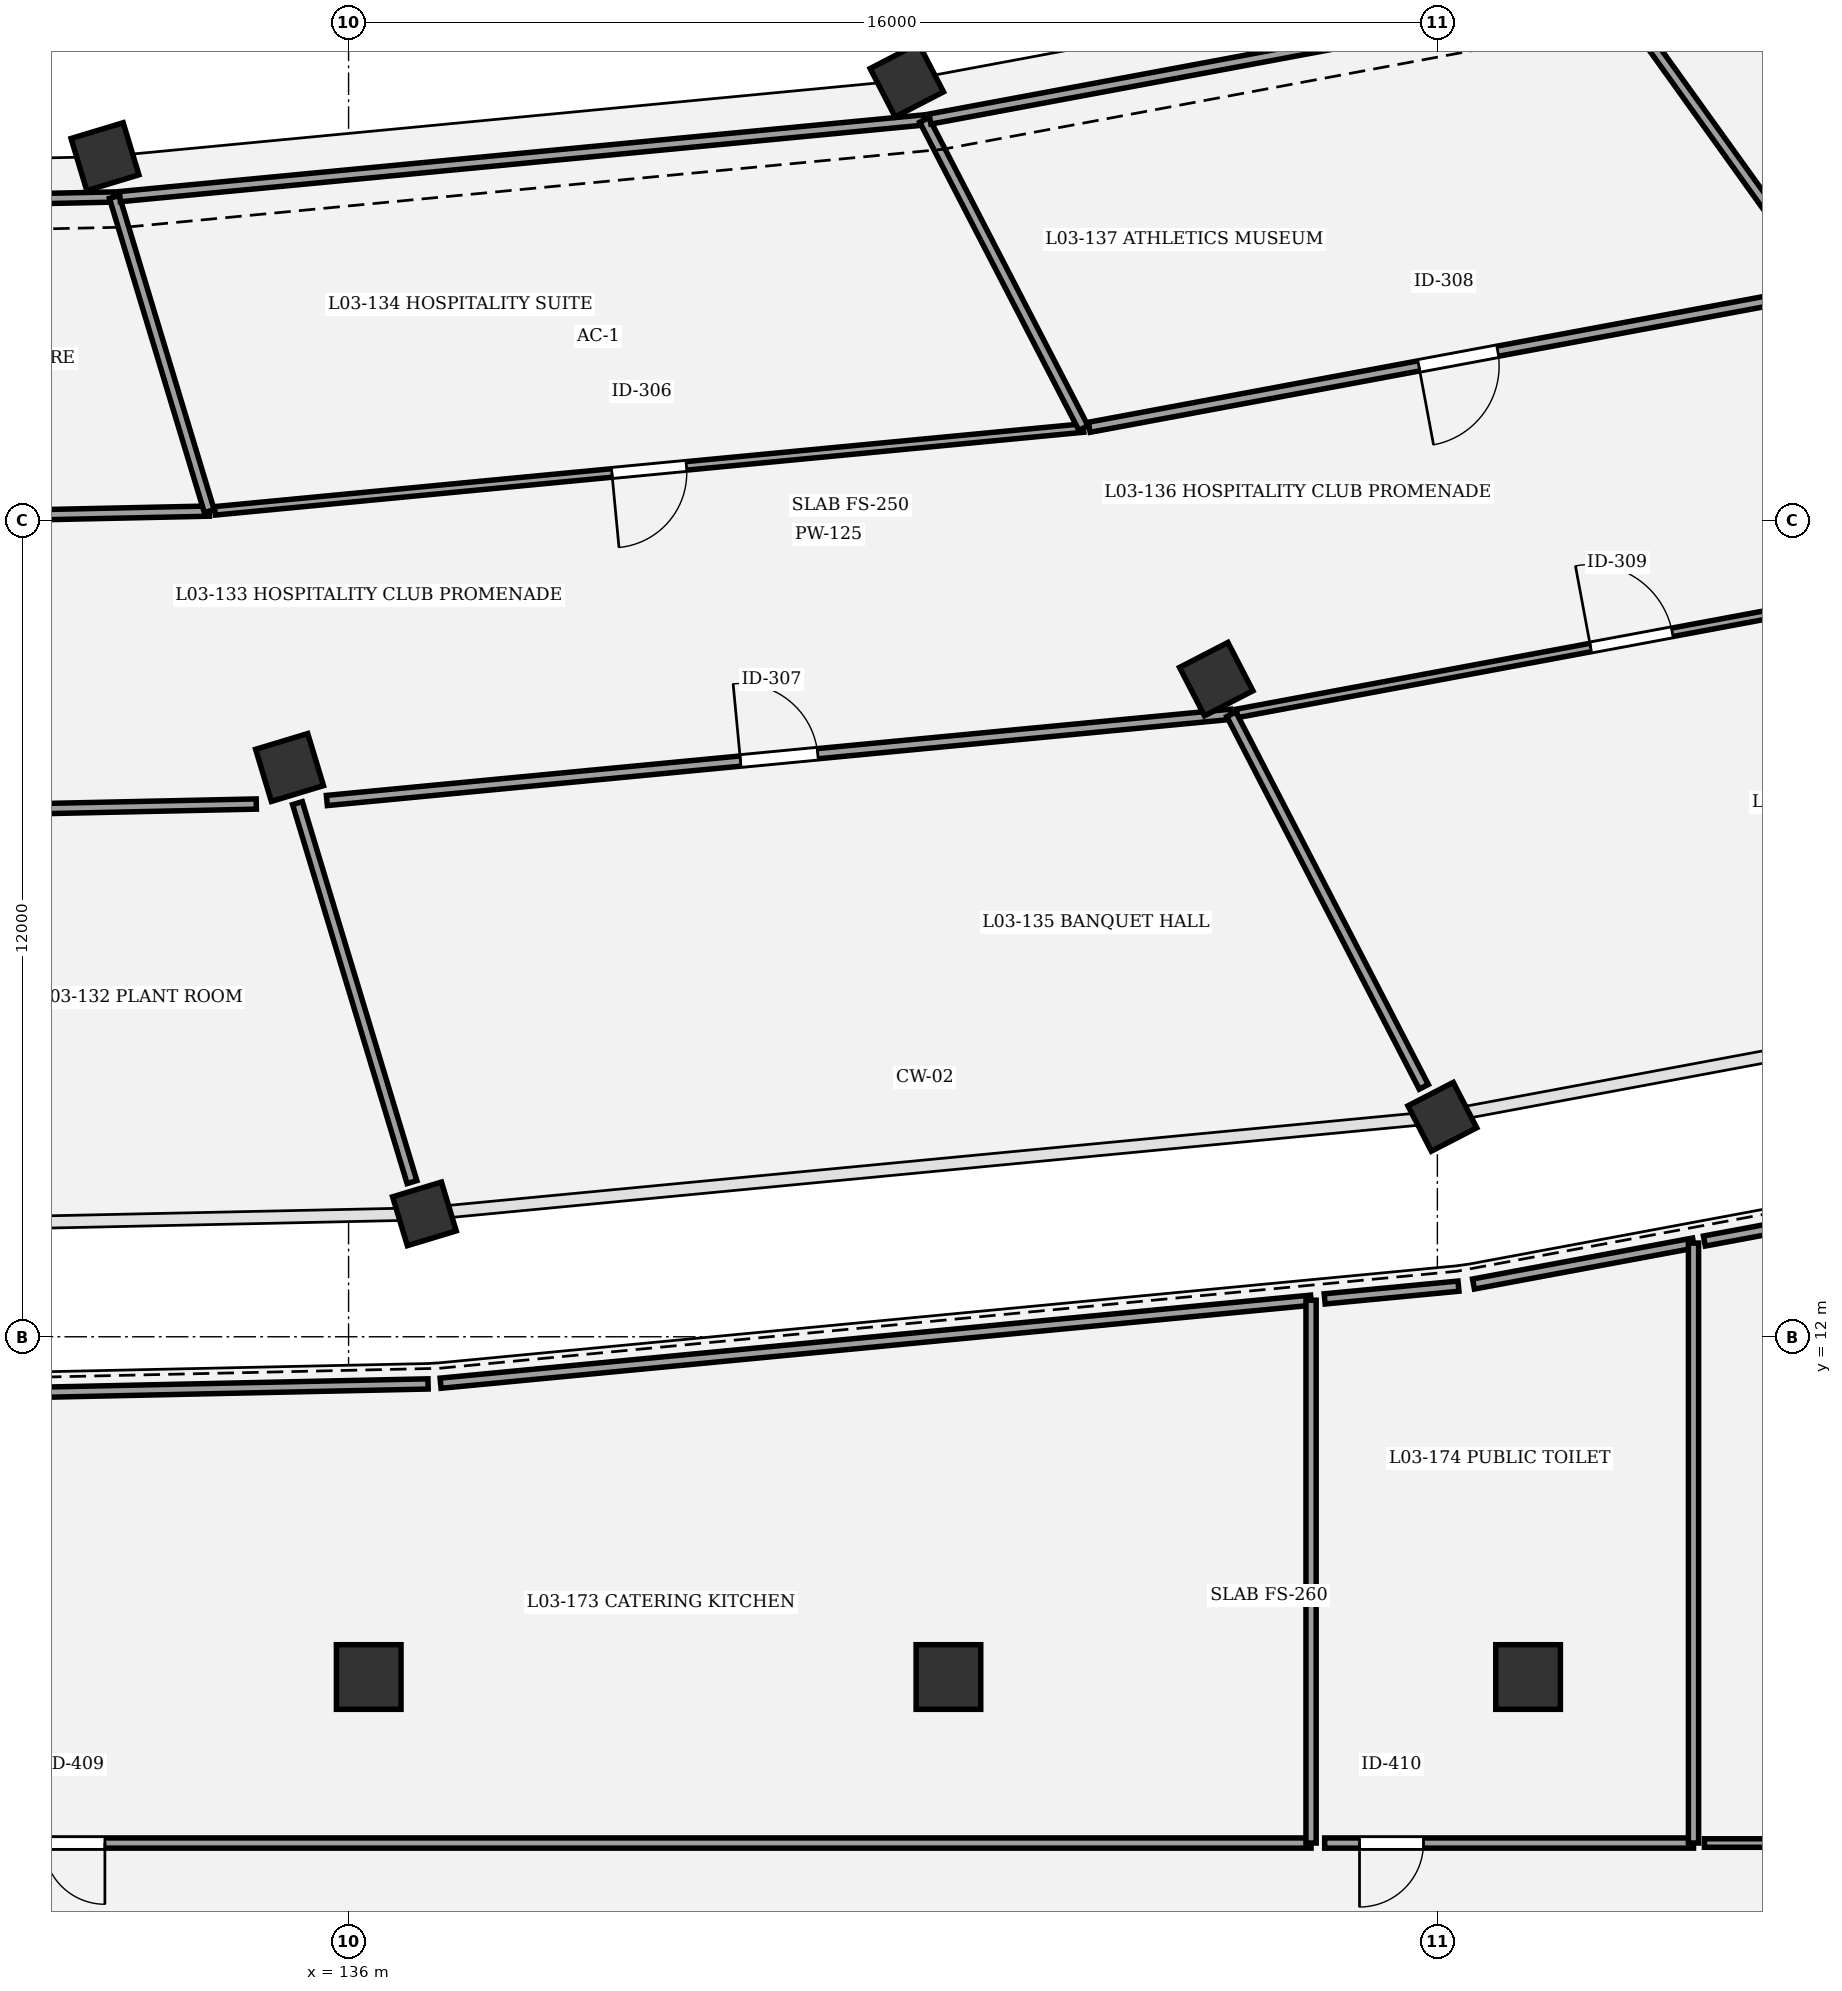
"""IFC4 building model, lengths in metres.
Left out: names, types, materials, properties, quantities, classifications, styles, units other than length and angle.
Written with IfcOpenShell. Run it as: python <this file> out.ifc"""

import sys

from ifc_helpers import new_model, si_unit, direction, frame, frame_2d, origin, origin_2d, place, context, subcontext, project, spatial, rectangle, circle, extrude, element, fill, save


model = new_model("IFC4")
c1 = context("Model", 3, precision=1e-05, world=origin(), true_north=direction((0.0, 1.0)))
c2 = subcontext(c1, "Body", "Model", "MODEL_VIEW")
j1 = project(units=[si_unit("LENGTHUNIT", "METRE"), si_unit("PLANEANGLEUNIT", "RADIAN")], contexts=[c1])
p1 = place(None, origin())
s1 = spatial("IfcSite", under=j1, at=p1, CompositionType="ELEMENT")
p2 = place(p1, origin())
s2 = spatial("IfcBuilding", under=s1, at=p2, CompositionType="ELEMENT")
p3 = place(p2, frame((0.0, 0.0, 14.7)))
s3 = spatial("IfcBuildingStorey", under=s2, at=p3, CompositionType="ELEMENT", Elevation=14.7)
p4 = place(p3, frame((132.42, 29.343, 0.0), z_axis=(0.0, 0.0, 1.0), x_axis=(0.289198876314, -0.957269037387, 0.0)))
e1 = element("IfcColumn", 1, at=p4, inside=s3, PredefinedType="COLUMN", context=c2, shape_type="SweptSolid", body=[
    extrude(rectangle(XDim=0.8, YDim=0.8, at=origin_2d()), origin(), (0.0, 0.0, 1.0), 2.85),
])
p5 = place(p3, frame((135.133, 20.366, 0.0), z_axis=(0.0, 0.0, 1.0), x_axis=(0.289198876314, -0.957269037387, 0.0)))
e2 = element("IfcColumn", 2, at=p5, inside=s3, PredefinedType="COLUMN", context=c2, shape_type="SweptSolid", body=[
    extrude(rectangle(XDim=0.8, YDim=0.8, at=origin_2d()), origin(), (0.0, 0.0, 1.0), 4.5),
])
p6 = place(p3, frame((137.115, 13.806, 0.0), z_axis=(0.0, 0.0, 1.0), x_axis=(0.289198876314, -0.957269037387, 0.0)))
e3 = element("IfcColumn", 3, at=p6, inside=s3, PredefinedType="COLUMN", context=c2, shape_type="SweptSolid", body=[
    extrude(rectangle(XDim=0.75, YDim=0.75, at=origin_2d()), origin(), (0.0, 0.0, 1.0), 4.5),
])
p7 = place(p3, frame((144.204, 30.466, 0.0), z_axis=(0.0, 0.0, 1.0), x_axis=(0.458959712465, -0.888457079624, 0.0)))
e4 = element("IfcColumn", 4, at=p7, inside=s3, PredefinedType="COLUMN", context=c2, shape_type="SweptSolid", body=[
    extrude(rectangle(XDim=0.8, YDim=0.8, at=origin_2d()), origin(), (0.0, 0.0, 1.0), 2.85),
])
p8 = place(p3, frame((148.75, 21.665, 0.0), z_axis=(0.0, 0.0, 1.0), x_axis=(0.458959712465, -0.888457079624, 0.0)))
e5 = element("IfcColumn", 5, at=p8, inside=s3, PredefinedType="COLUMN", context=c2, shape_type="SweptSolid", body=[
    extrude(rectangle(XDim=0.8, YDim=0.8, at=origin_2d()), origin(), (0.0, 0.0, 1.0), 4.5),
])
p9 = place(p3, frame((152.073, 15.233, 0.0), z_axis=(0.0, 0.0, 1.0), x_axis=(0.458959712465, -0.888457079624, 0.0)))
e6 = element("IfcColumn", 6, at=p9, inside=s3, PredefinedType="COLUMN", context=c2, shape_type="SweptSolid", body=[
    extrude(rectangle(XDim=0.75, YDim=0.75, at=origin_2d()), origin(), (0.0, 0.0, 1.0), 4.5),
])
for number, where, z_axis, x_axis in (
    (7, (136.296, 7.0, 0.0), (0.0, 0.0, 1.0), (1.0, 0.0, 0.0)),
    (8, (144.815, 7.0, 0.0), (0.0, 0.0, 1.0), (1.0, 0.0, 0.0)),
    (9, (153.333, 7.0, 0.0), (0.0, 0.0, 1.0), (1.0, 0.0, 0.0)),
):
    element("IfcColumn", number, at=place(p3, frame(where, z_axis=z_axis, x_axis=x_axis)), inside=s3, PredefinedType="COLUMN", context=c2, shape_type="SweptSolid", body=[
        extrude(circle(Radius=0.475, at=origin_2d()), origin(), (0.0, 0.0, 1.0), 4.5),
    ])
p10 = place(p3, frame((133.953, 24.134, 0.0), z_axis=(0.0, 0.0, 1.0), x_axis=(-0.999768266483, -0.021527037261, 0.0)))
e10 = element("IfcWall", 10, at=p10, inside=s3, PredefinedType="PARTITIONING", context=c2, shape_type="SweptSolid", body=[
    extrude(rectangle(XDim=18.917, YDim=0.15, at=frame_2d((9.458, 0.0))), origin(), (0.0, 0.0, 1.0), 3.25),
])
p11 = place(p10, frame((8.948, 0.0, 0.0)))
e11 = element("IfcOpeningElement", 11, at=p11, cuts=e10, PredefinedType="OPENING", context=c2, shape_type="SweptSolid", body=[
    extrude(rectangle(XDim=1.02, YDim=2.2, at=frame_2d((0.51, 1.1))), frame((0.0, 0.085, 0.0), z_axis=(0.0, -1.0, 0.0), x_axis=(1.0, 0.0, 0.0)), (0.0, 0.0, 1.0), 0.17),
])
p12 = place(p3, frame((115.511, 19.417, 0.0), z_axis=(0.0, 0.0, 1.0), x_axis=(0.999768107727, 0.021534409017, 0.0)))
e12 = element("IfcWall", 12, at=p12, inside=s3, PredefinedType="PARTITIONING", context=c2, shape_type="SweptSolid", body=[
    extrude(rectangle(XDim=19.137, YDim=0.15, at=frame_2d((9.569, 0.0))), origin(), (0.0, 0.0, 1.0), 3.25),
])
p13 = place(p12, frame((9.039, 0.0, 0.0)))
e13 = element("IfcOpeningElement", 13, at=p13, cuts=e12, PredefinedType="OPENING", context=c2, shape_type="SweptSolid", body=[
    extrude(rectangle(XDim=1.06, YDim=2.2, at=frame_2d((0.53, 1.1))), frame((0.0, 0.085, 0.0), z_axis=(0.0, -1.0, 0.0), x_axis=(1.0, 0.0, 0.0)), (0.0, 0.0, 1.0), 0.17),
])
p14 = place(p3, frame((146.799, 25.355, 0.0), z_axis=(0.0, 0.0, 1.0), x_axis=(-0.995485111947, -0.094917816515, 0.0)))
e14 = element("IfcWall", 14, at=p14, inside=s3, PredefinedType="PARTITIONING", context=c2, shape_type="SweptSolid", body=[
    extrude(rectangle(XDim=12.822, YDim=0.125, at=frame_2d((6.411, 0.0))), origin(), (0.0, 0.0, 1.0), 3.25),
])
p15 = place(p14, frame((5.861, 0.0, 0.0)))
e15 = element("IfcOpeningElement", 15, at=p15, cuts=e14, PredefinedType="OPENING", context=c2, shape_type="SweptSolid", body=[
    extrude(rectangle(XDim=1.1, YDim=2.2, at=frame_2d((0.55, 1.1))), frame((0.0, 0.073, 0.0), z_axis=(0.0, -1.0, 0.0), x_axis=(1.0, 0.0, 0.0)), (0.0, 0.0, 1.0), 0.145),
])
p16 = place(p3, frame((135.681, 19.881, 0.0), z_axis=(0.0, 0.0, 1.0), x_axis=(0.995484535327, 0.094923863827, 0.0)))
e16 = element("IfcWall", 16, at=p16, inside=s3, PredefinedType="PARTITIONING", context=c2, shape_type="SweptSolid", body=[
    extrude(rectangle(XDim=13.351, YDim=0.15, at=frame_2d((6.676, 0.0))), origin(), (0.0, 0.0, 1.0), 3.25),
])
p17 = place(p16, frame((6.105, 0.0, 0.0)))
e17 = element("IfcOpeningElement", 17, at=p17, cuts=e16, PredefinedType="OPENING", context=c2, shape_type="SweptSolid", body=[
    extrude(rectangle(XDim=1.14, YDim=2.2, at=frame_2d((0.57, 1.1))), frame((0.0, 0.085, 0.0), z_axis=(0.0, -1.0, 0.0), x_axis=(1.0, 0.0, 0.0)), (0.0, 0.0, 1.0), 0.17),
])
p18 = place(p3, frame((157.732, 27.386, 0.0), z_axis=(0.0, 0.0, 1.0), x_axis=(-0.983097372707, -0.183083466695, 0.0)))
e18 = element("IfcWall", 18, at=p18, inside=s3, PredefinedType="PARTITIONING", context=c2, shape_type="SweptSolid", body=[
    extrude(rectangle(XDim=11.035, YDim=0.15, at=frame_2d((5.517, 0.0))), origin(), (0.0, 0.0, 1.0), 3.25),
])
p19 = place(p18, frame((4.927, 0.0, 0.0)))
e19 = element("IfcOpeningElement", 19, at=p19, cuts=e18, PredefinedType="OPENING", context=c2, shape_type="SweptSolid", body=[
    extrude(rectangle(XDim=1.18, YDim=2.2, at=frame_2d((0.59, 1.1))), frame((0.0, 0.085, 0.0), z_axis=(0.0, -1.0, 0.0), x_axis=(1.0, 0.0, 0.0)), (0.0, 0.0, 1.0), 0.17),
])
p20 = place(p3, frame((149.055, 21.161, 0.0), z_axis=(0.0, 0.0, 1.0), x_axis=(0.983095748229, 0.183092189385, 0.0)))
e20 = element("IfcWall", 20, at=p20, inside=s3, PredefinedType="PARTITIONING", context=c2, shape_type="SweptSolid", body=[
    extrude(rectangle(XDim=11.793, YDim=0.125, at=frame_2d((5.896, 0.0))), origin(), (0.0, 0.0, 1.0), 3.25),
])
p21 = place(p20, frame((5.287, 0.0, 0.0)))
e21 = element("IfcOpeningElement", 21, at=p21, cuts=e20, PredefinedType="OPENING", context=c2, shape_type="SweptSolid", body=[
    extrude(rectangle(XDim=1.22, YDim=2.2, at=frame_2d((0.61, 1.1))), frame((0.0, 0.073, 0.0), z_axis=(0.0, -1.0, 0.0), x_axis=(1.0, 0.0, 0.0)), (0.0, 0.0, 1.0), 0.145),
])
p22 = place(p3, frame((150.144, 4.56, 0.0), z_axis=(0.0, 0.0, 1.0), x_axis=(-1.0, 0.0, 0.0)))
e22 = element("IfcWall", 22, at=p22, inside=s3, PredefinedType="PARTITIONING", context=c2, shape_type="SweptSolid", body=[
    extrude(rectangle(XDim=23.296, YDim=0.15, at=frame_2d((11.648, 0.0))), origin(), (0.0, 0.0, 1.0), 3.25),
])
p23 = place(p22, frame((17.725, 0.0, 0.0)))
e23 = element("IfcOpeningElement", 23, at=p23, cuts=e22, PredefinedType="OPENING", context=c2, shape_type="SweptSolid", body=[
    extrude(rectangle(XDim=0.9, YDim=2.2, at=frame_2d((0.45, 1.1))), frame((0.0, 0.085, 0.0), z_axis=(0.0, -1.0, 0.0), x_axis=(1.0, 0.0, 0.0)), (0.0, 0.0, 1.0), 0.17),
])
p24 = place(p3, frame((155.764, 4.56, 0.0), z_axis=(0.0, 0.0, 1.0), x_axis=(-1.0, 0.0, 0.0)))
e24 = element("IfcWall", 24, at=p24, inside=s3, PredefinedType="PARTITIONING", context=c2, shape_type="SweptSolid", body=[
    extrude(rectangle(XDim=5.42, YDim=0.15, at=frame_2d((2.71, 0.0))), origin(), (0.0, 0.0, 1.0), 3.25),
])
p25 = place(p24, frame((3.968, 0.0, 0.0)))
e25 = element("IfcOpeningElement", 25, at=p25, cuts=e24, PredefinedType="OPENING", context=c2, shape_type="SweptSolid", body=[
    extrude(rectangle(XDim=0.94, YDim=2.2, at=frame_2d((0.47, 1.1))), frame((0.0, 0.085, 0.0), z_axis=(0.0, -1.0, 0.0), x_axis=(1.0, 0.0, 0.0)), (0.0, 0.0, 1.0), 0.17),
])
p26 = place(p3, frame((173.64, 4.56, 0.0), z_axis=(0.0, 0.0, 1.0), x_axis=(-1.0, 0.0, 0.0)))
e26 = element("IfcWall", 26, at=p26, inside=s3, PredefinedType="PARTITIONING", context=c2, shape_type="SweptSolid", body=[
    extrude(rectangle(XDim=17.716, YDim=0.125, at=frame_2d((8.858, 0.0))), origin(), (0.0, 0.0, 1.0), 3.25),
])
p27 = place(p26, frame((15.611, 0.0, 0.0)))
e27 = element("IfcOpeningElement", 27, at=p27, cuts=e26, PredefinedType="OPENING", context=c2, shape_type="SweptSolid", body=[
    extrude(rectangle(XDim=0.98, YDim=2.2, at=frame_2d((0.49, 1.1))), frame((0.0, 0.073, 0.0), z_axis=(0.0, -1.0, 0.0), x_axis=(1.0, 0.0, 0.0)), (0.0, 0.0, 1.0), 0.145),
])
p28 = place(p3, frame((115.04, 28.372, 0.0), z_axis=(0.0, 0.0, 1.0), x_axis=(0.999768262744, 0.021527210931, 0.0)))
e28 = element("IfcWall", 28, at=p28, inside=s3, PredefinedType="PARTITIONING", context=c2, shape_type="SweptSolid", body=[
    extrude(rectangle(XDim=17.522, YDim=0.15, at=frame_2d((8.761, 0.0))), origin(), (0.0, 0.0, 1.0), 3.25),
])
p29 = place(p3, frame((132.558, 28.75, 0.0), z_axis=(0.0, 0.0, 1.0), x_axis=(0.289247092823, -0.957254469456, 0.0)))
e29 = element("IfcWall", 29, at=p29, inside=s3, PredefinedType="PARTITIONING", context=c2, shape_type="SweptSolid", body=[
    extrude(rectangle(XDim=4.822, YDim=0.15, at=frame_2d((2.411, 0.0))), origin(), (0.0, 0.0, 1.0), 3.25),
])
p30 = place(p3, frame((135.249, 19.842, 0.0), z_axis=(0.0, 0.0, 1.0), x_axis=(0.289195444178, -0.957270074256, 0.0)))
e30 = element("IfcWall", 30, at=p30, inside=s3, PredefinedType="PARTITIONING", context=c2, shape_type="SweptSolid", body=[
    extrude(rectangle(XDim=5.817, YDim=0.15, at=frame_2d((2.909, 0.0))), origin(), (0.0, 0.0, 1.0), 3.25),
])
p31 = place(p3, frame((132.64, 28.755, 0.0), z_axis=(0.0, 0.0, 1.0), x_axis=(0.995483914052, 0.094930379031, 0.0)))
e31 = element("IfcWall", 31, at=p31, inside=s3, PredefinedType="PARTITIONING", context=c2, shape_type="SweptSolid", body=[
    extrude(rectangle(XDim=11.874, YDim=0.15, at=frame_2d((5.937, 0.0))), origin(), (0.0, 0.0, 1.0), 3.25),
])
p32 = place(p3, frame((144.46, 29.882, 0.0), z_axis=(0.0, 0.0, 1.0), x_axis=(0.458979714818, -0.888446746511, 0.0)))
e32 = element("IfcWall", 32, at=p32, inside=s3, PredefinedType="PARTITIONING", context=c2, shape_type="SweptSolid", body=[
    extrude(rectangle(XDim=5.096, YDim=0.15, at=frame_2d((2.548, 0.0))), origin(), (0.0, 0.0, 1.0), 3.25),
])
p33 = place(p3, frame((148.972, 21.148, 0.0), z_axis=(0.0, 0.0, 1.0), x_axis=(0.45896480759, -0.888454447563, 0.0)))
e33 = element("IfcWall", 33, at=p33, inside=s3, PredefinedType="PARTITIONING", context=c2, shape_type="SweptSolid", body=[
    extrude(rectangle(XDim=6.163, YDim=0.15, at=frame_2d((3.081, 0.0))), origin(), (0.0, 0.0, 1.0), 3.25),
])
p34 = place(p3, frame((144.544, 29.895, 0.0), z_axis=(0.0, 0.0, 1.0), x_axis=(0.983093557334, 0.183103952795, 0.0)))
e34 = element("IfcWall", 34, at=p34, inside=s3, PredefinedType="PARTITIONING", context=c2, shape_type="SweptSolid", body=[
    extrude(rectangle(XDim=10.218, YDim=0.15, at=frame_2d((5.109, 0.0))), origin(), (0.0, 0.0, 1.0), 3.25),
])
p35 = place(p3, frame((154.588, 31.766, 0.0), z_axis=(0.0, 0.0, 1.0), x_axis=(0.58303590775, -0.812446386092, 0.0)))
e35 = element("IfcWall", 35, at=p35, inside=s3, PredefinedType="PARTITIONING", context=c2, shape_type="SweptSolid", body=[
    extrude(rectangle(XDim=5.391, YDim=0.15, at=frame_2d((2.696, 0.0))), origin(), (0.0, 0.0, 1.0), 3.25),
])
p36 = place(p3, frame((128.35, 11.117, 0.0), z_axis=(0.0, 0.0, 1.0), x_axis=(0.999768109674, 0.021534318641, 0.0)))
e36 = element("IfcWall", 36, at=p36, inside=s3, PredefinedType="PARTITIONING", context=c2, shape_type="SweptSolid", body=[
    extrude(rectangle(XDim=8.82, YDim=0.15, at=frame_2d((4.41, 0.0))), origin(), (0.0, 0.0, 1.0), 3.25),
])
p37 = place(p3, frame((137.352, 11.317, 0.0), z_axis=(0.0, 0.0, 1.0), x_axis=(0.995483253835, 0.094937302124, 0.0)))
e37 = element("IfcWall", 37, at=p37, inside=s3, PredefinedType="PARTITIONING", context=c2, shape_type="SweptSolid", body=[
    extrude(rectangle(XDim=12.85, YDim=0.15, at=frame_2d((6.425, 0.0))), origin(), (0.0, 0.0, 1.0), 3.25),
])
p38 = place(p3, frame((150.144, 12.537, 0.0), z_axis=(0.0, 0.0, 1.0), x_axis=(0.0, -1.0, 0.0)))
e38 = element("IfcWall", 38, at=p38, inside=s3, PredefinedType="PARTITIONING", context=c2, shape_type="SweptSolid", body=[
    extrude(rectangle(XDim=7.977, YDim=0.15, at=frame_2d((3.989, 0.0))), origin(), (0.0, 0.0, 1.0), 3.25),
])
p39 = place(p3, frame((152.531, 12.775, 0.0), z_axis=(0.0, 0.0, 1.0), x_axis=(0.983089981796, 0.18312314898, 0.0)))
e39 = element("IfcWall", 39, at=p39, inside=s3, PredefinedType="PARTITIONING", context=c2, shape_type="SweptSolid", body=[
    extrude(rectangle(XDim=3.289, YDim=0.15, at=frame_2d((1.645, 0.0))), origin(), (0.0, 0.0, 1.0), 3.25),
])
p40 = place(p3, frame((155.764, 13.377, 0.0), z_axis=(0.0, 0.0, 1.0), x_axis=(0.0, -1.0, 0.0)))
e40 = element("IfcWall", 40, at=p40, inside=s3, PredefinedType="PARTITIONING", context=c2, shape_type="SweptSolid", body=[
    extrude(rectangle(XDim=8.817, YDim=0.15, at=frame_2d((4.409, 0.0))), origin(), (0.0, 0.0, 1.0), 3.25),
])
p41 = place(p3, frame((150.344, 12.556, 0.0), z_axis=(0.0, 0.0, 1.0), x_axis=(0.995483241572, 0.094937430712, 0.0)))
e41 = element("IfcWall", 41, at=p41, inside=s3, PredefinedType="PARTITIONING", context=c2, shape_type="SweptSolid", body=[
    extrude(rectangle(XDim=1.975, YDim=0.15, at=frame_2d((0.988, 0.0))), origin(), (0.0, 0.0, 1.0), 3.25),
])
p42 = place(p3, frame((155.924, 13.407, 0.0), z_axis=(0.0, 0.0, 1.0), x_axis=(0.983095301178, 0.183094589766, 0.0)))
e42 = element("IfcWall", 42, at=p42, inside=s3, PredefinedType="PARTITIONING", context=c2, shape_type="SweptSolid", body=[
    extrude(rectangle(XDim=9.495, YDim=0.15, at=frame_2d((4.748, 0.0))), origin(), (0.0, 0.0, 1.0), 3.25),
])
p43 = place(p15, origin())
e43 = element("IfcDoor", 43, at=p43, inside=s3, OperationType="SINGLE_SWING_RIGHT", PredefinedType="DOOR", context=c2, shape_type="SweptSolid", body=[
    extrude(rectangle(XDim=1.1, YDim=2.2, at=frame_2d((0.55, 1.1))), frame((0.0, 0.025, 0.0), z_axis=(0.0, -1.0, 0.0), x_axis=(1.0, 0.0, 0.0)), (0.0, 0.0, 1.0), 0.05),
])
fill(e15, e43)
p44 = place(p17, origin())
e44 = element("IfcDoor", 44, at=p44, inside=s3, OperationType="SINGLE_SWING_LEFT", PredefinedType="DOOR", context=c2, shape_type="SweptSolid", body=[
    extrude(rectangle(XDim=1.14, YDim=2.2, at=frame_2d((0.57, 1.1))), frame((0.0, 0.025, 0.0), z_axis=(0.0, -1.0, 0.0), x_axis=(1.0, 0.0, 0.0)), (0.0, 0.0, 1.0), 0.05),
])
fill(e17, e44)
p45 = place(p19, origin())
e45 = element("IfcDoor", 45, at=p45, inside=s3, OperationType="SINGLE_SWING_RIGHT", PredefinedType="DOOR", context=c2, shape_type="SweptSolid", body=[
    extrude(rectangle(XDim=1.18, YDim=2.2, at=frame_2d((0.59, 1.1))), frame((0.0, 0.025, 0.0), z_axis=(0.0, -1.0, 0.0), x_axis=(1.0, 0.0, 0.0)), (0.0, 0.0, 1.0), 0.05),
])
fill(e19, e45)
p46 = place(p21, origin())
e46 = element("IfcDoor", 46, at=p46, inside=s3, OperationType="SINGLE_SWING_LEFT", PredefinedType="DOOR", context=c2, shape_type="SweptSolid", body=[
    extrude(rectangle(XDim=1.22, YDim=2.2, at=frame_2d((0.61, 1.1))), frame((0.0, 0.025, 0.0), z_axis=(0.0, -1.0, 0.0), x_axis=(1.0, 0.0, 0.0)), (0.0, 0.0, 1.0), 0.05),
])
fill(e21, e46)
p47 = place(p23, origin())
e47 = element("IfcDoor", 47, at=p47, inside=s3, OperationType="SINGLE_SWING_LEFT", PredefinedType="DOOR", context=c2, shape_type="SweptSolid", body=[
    extrude(rectangle(XDim=0.9, YDim=2.2, at=frame_2d((0.45, 1.1))), frame((0.0, 0.025, 0.0), z_axis=(0.0, -1.0, 0.0), x_axis=(1.0, 0.0, 0.0)), (0.0, 0.0, 1.0), 0.05),
])
fill(e23, e47)
p48 = place(p25, origin())
e48 = element("IfcDoor", 48, at=p48, inside=s3, OperationType="SINGLE_SWING_RIGHT", PredefinedType="DOOR", context=c2, shape_type="SweptSolid", body=[
    extrude(rectangle(XDim=0.94, YDim=2.2, at=frame_2d((0.47, 1.1))), frame((0.0, 0.025, 0.0), z_axis=(0.0, -1.0, 0.0), x_axis=(1.0, 0.0, 0.0)), (0.0, 0.0, 1.0), 0.05),
])
fill(e25, e48)
save(model, sys.argv[1])
